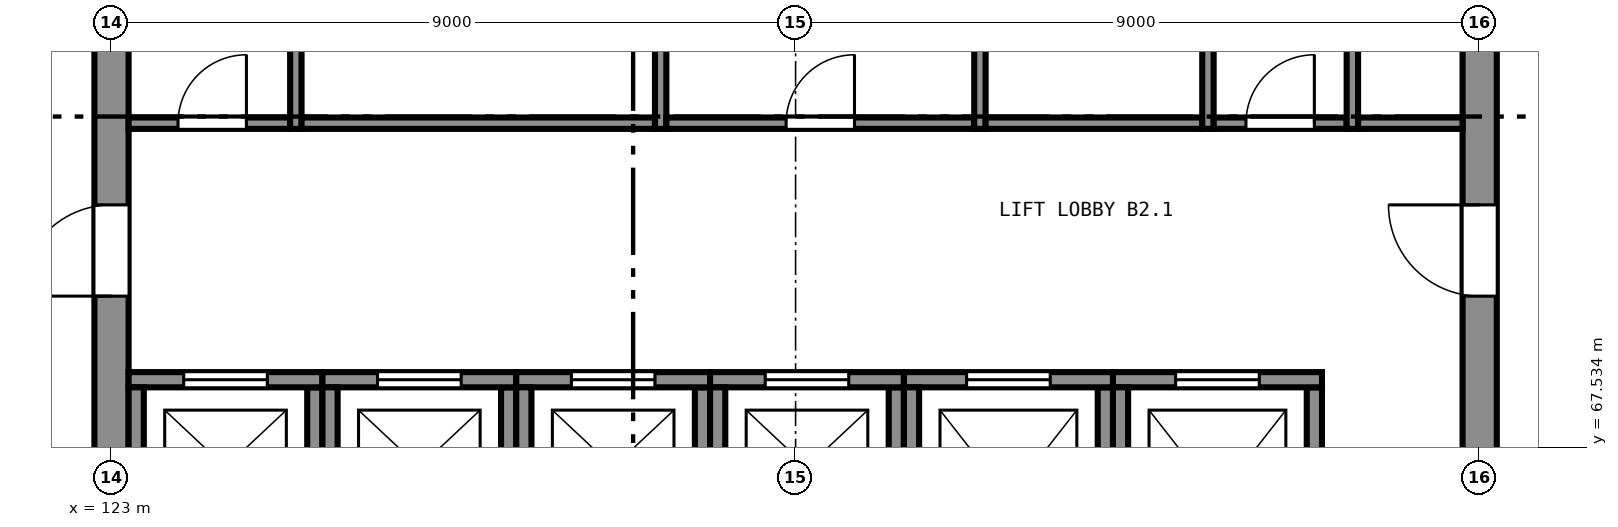
"""IFC4 building model, lengths in metres.
Left out: names, types, materials, properties, quantities, classifications, styles, units other than length and angle.
Written with IfcOpenShell. Run it as: python <this file> out.ifc"""

import sys

from ifc_helpers import new_model, si_unit, direction, frame, frame_2d, origin, place, context, subcontext, project, spatial, rectangle, extrude, element, fill, save


model = new_model("IFC4")
c1 = context("Model", 3, precision=1e-05, world=origin(), true_north=direction((0.0, 1.0)))
c2 = subcontext(c1, "Body", "Model", "MODEL_VIEW")
j1 = project(units=[si_unit("LENGTHUNIT", "METRE"), si_unit("PLANEANGLEUNIT", "RADIAN")], contexts=[c1])
p1 = place(None, origin())
s1 = spatial("IfcSite", under=j1, at=p1, CompositionType="ELEMENT")
p2 = place(p1, origin())
s2 = spatial("IfcBuilding", under=s1, at=p2, CompositionType="ELEMENT")
p3 = place(p2, frame((0.0, 0.0, -10.0)))
s3 = spatial("IfcBuildingStorey", under=s2, at=p3, CompositionType="ELEMENT", Elevation=-10.0)
p4 = place(p3, frame((141.0, 65.225, 0.0), z_axis=(0.0, 0.0, 1.0), x_axis=(0.0, 1.0, 0.0)))
e1 = element("IfcWall", 1, at=p4, inside=s3, PredefinedType="SHEAR", context=c2, shape_type="SweptSolid", body=[
    extrude(rectangle(XDim=17.55, YDim=0.45, at=frame_2d((8.775, 0.0))), origin(), (0.0, 0.0, 1.0), 5.0),
])
p5 = place(p4, frame((4.3, 0.0, 0.0)))
e2 = element("IfcOpeningElement", 2, at=p5, cuts=e1, PredefinedType="OPENING", context=c2, shape_type="SweptSolid", body=[
    extrude(rectangle(XDim=1.2, YDim=2.1, at=frame_2d((0.6, 1.05))), frame((0.0, 0.235, 0.0), z_axis=(0.0, -1.0, 0.0), x_axis=(1.0, 0.0, 0.0)), (0.0, 0.0, 1.0), 0.47),
])
p6 = place(p4, frame((12.05, 0.0, 0.0)))
e3 = element("IfcOpeningElement", 3, at=p6, cuts=e1, PredefinedType="OPENING", context=c2, shape_type="SweptSolid", body=[
    extrude(rectangle(XDim=1.2, YDim=2.1, at=frame_2d((0.6, 1.05))), frame((0.0, 0.235, 0.0), z_axis=(0.0, -1.0, 0.0), x_axis=(1.0, 0.0, 0.0)), (0.0, 0.0, 1.0), 0.47),
])
p7 = place(p3, frame((123.0, 82.775, 0.0), z_axis=(0.0, 0.0, 1.0), x_axis=(0.0, -1.0, 0.0)))
e4 = element("IfcWall", 4, at=p7, inside=s3, PredefinedType="SHEAR", context=c2, shape_type="SweptSolid", body=[
    extrude(rectangle(XDim=17.55, YDim=0.45, at=frame_2d((8.775, 0.0))), origin(), (0.0, 0.0, 1.0), 5.0),
])
p8 = place(p7, frame((12.05, 0.0, 0.0)))
e5 = element("IfcOpeningElement", 5, at=p8, cuts=e4, PredefinedType="OPENING", context=c2, shape_type="SweptSolid", body=[
    extrude(rectangle(XDim=1.2, YDim=2.1, at=frame_2d((0.6, 1.05))), frame((0.0, 0.235, 0.0), z_axis=(0.0, -1.0, 0.0), x_axis=(1.0, 0.0, 0.0)), (0.0, 0.0, 1.0), 0.47),
])
p9 = place(p7, frame((4.3, 0.0, 0.0)))
e6 = element("IfcOpeningElement", 6, at=p9, cuts=e4, PredefinedType="OPENING", context=c2, shape_type="SweptSolid", body=[
    extrude(rectangle(XDim=1.2, YDim=2.1, at=frame_2d((0.6, 1.05))), frame((0.0, 0.235, 0.0), z_axis=(0.0, -1.0, 0.0), x_axis=(1.0, 0.0, 0.0)), (0.0, 0.0, 1.0), 0.47),
])
p10 = place(p3, frame((125.675, 66.225, -1.9), z_axis=(0.0, 0.0, 1.0), x_axis=(0.0, 1.0, 0.0)))
e7 = element("IfcWall", 7, at=p10, inside=s3, PredefinedType="SHEAR", context=c2, shape_type="SweptSolid", body=[
    extrude(rectangle(XDim=2.1, YDim=0.2, at=frame_2d((1.05, 0.0))), origin(), (0.0, 0.0, 1.0), 6.9),
])
p11 = place(p3, frame((125.775, 68.425, -1.9), z_axis=(0.0, 0.0, 1.0), x_axis=(-1.0, 0.0, 0.0)))
e8 = element("IfcWall", 8, at=p11, inside=s3, PredefinedType="SHEAR", context=c2, shape_type="SweptSolid", body=[
    extrude(rectangle(XDim=2.55, YDim=0.2, at=frame_2d((1.275, 0.0))), origin(), (0.0, 0.0, 1.0), 6.9),
])
p12 = place(p11, frame((0.725, 0.0, 1.9)))
e9 = element("IfcOpeningElement", 9, at=p12, cuts=e8, PredefinedType="OPENING", context=c2, shape_type="SweptSolid", body=[
    extrude(rectangle(XDim=1.1, YDim=2.1, at=frame_2d((0.55, 1.05))), frame((0.0, 0.11, 0.0), z_axis=(0.0, -1.0, 0.0), x_axis=(1.0, 0.0, 0.0)), (0.0, 0.0, 1.0), 0.22),
])
for number, where, z_axis, x_axis in (
    (10, (123.325, 68.325, -1.9), (0.0, 0.0, 1.0), (0.0, -1.0, 0.0)),
    (11, (128.225, 66.225, -1.9), (0.0, 0.0, 1.0), (0.0, 1.0, 0.0)),
):
    element("IfcWall", number, at=place(p3, frame(where, z_axis=z_axis, x_axis=x_axis)), inside=s3, PredefinedType="SHEAR", context=c2, shape_type="SweptSolid", body=[
        extrude(rectangle(XDim=2.1, YDim=0.2, at=frame_2d((1.05, 0.0))), origin(), (0.0, 0.0, 1.0), 6.9),
    ])
p13 = place(p3, frame((128.325, 68.425, -1.9), z_axis=(0.0, 0.0, 1.0), x_axis=(-1.0, 0.0, 0.0)))
e12 = element("IfcWall", 12, at=p13, inside=s3, PredefinedType="SHEAR", context=c2, shape_type="SweptSolid", body=[
    extrude(rectangle(XDim=2.55, YDim=0.2, at=frame_2d((1.275, 0.0))), origin(), (0.0, 0.0, 1.0), 6.9),
])
p14 = place(p13, frame((0.725, 0.0, 1.9)))
e13 = element("IfcOpeningElement", 13, at=p14, cuts=e12, PredefinedType="OPENING", context=c2, shape_type="SweptSolid", body=[
    extrude(rectangle(XDim=1.1, YDim=2.1, at=frame_2d((0.55, 1.05))), frame((0.0, 0.11, 0.0), z_axis=(0.0, -1.0, 0.0), x_axis=(1.0, 0.0, 0.0)), (0.0, 0.0, 1.0), 0.22),
])
for number, where, z_axis, x_axis in (
    (14, (125.875, 68.325, -1.9), (0.0, 0.0, 1.0), (0.0, -1.0, 0.0)),
    (15, (130.775, 66.225, -1.9), (0.0, 0.0, 1.0), (0.0, 1.0, 0.0)),
):
    element("IfcWall", number, at=place(p3, frame(where, z_axis=z_axis, x_axis=x_axis)), inside=s3, PredefinedType="SHEAR", context=c2, shape_type="SweptSolid", body=[
        extrude(rectangle(XDim=2.1, YDim=0.2, at=frame_2d((1.05, 0.0))), origin(), (0.0, 0.0, 1.0), 6.9),
    ])
p15 = place(p3, frame((130.875, 68.425, -1.9), z_axis=(0.0, 0.0, 1.0), x_axis=(-1.0, 0.0, 0.0)))
e16 = element("IfcWall", 16, at=p15, inside=s3, PredefinedType="SHEAR", context=c2, shape_type="SweptSolid", body=[
    extrude(rectangle(XDim=2.55, YDim=0.2, at=frame_2d((1.275, 0.0))), origin(), (0.0, 0.0, 1.0), 6.9),
])
p16 = place(p15, frame((0.725, 0.0, 1.9)))
e17 = element("IfcOpeningElement", 17, at=p16, cuts=e16, PredefinedType="OPENING", context=c2, shape_type="SweptSolid", body=[
    extrude(rectangle(XDim=1.1, YDim=2.1, at=frame_2d((0.55, 1.05))), frame((0.0, 0.11, 0.0), z_axis=(0.0, -1.0, 0.0), x_axis=(1.0, 0.0, 0.0)), (0.0, 0.0, 1.0), 0.22),
])
for number, where, z_axis, x_axis in (
    (18, (128.425, 68.325, -1.9), (0.0, 0.0, 1.0), (0.0, -1.0, 0.0)),
    (19, (133.325, 66.225, -1.9), (0.0, 0.0, 1.0), (0.0, 1.0, 0.0)),
):
    element("IfcWall", number, at=place(p3, frame(where, z_axis=z_axis, x_axis=x_axis)), inside=s3, PredefinedType="SHEAR", context=c2, shape_type="SweptSolid", body=[
        extrude(rectangle(XDim=2.1, YDim=0.2, at=frame_2d((1.05, 0.0))), origin(), (0.0, 0.0, 1.0), 6.9),
    ])
p17 = place(p3, frame((133.425, 68.425, -1.9), z_axis=(0.0, 0.0, 1.0), x_axis=(-1.0, 0.0, 0.0)))
e20 = element("IfcWall", 20, at=p17, inside=s3, PredefinedType="SHEAR", context=c2, shape_type="SweptSolid", body=[
    extrude(rectangle(XDim=2.55, YDim=0.2, at=frame_2d((1.275, 0.0))), origin(), (0.0, 0.0, 1.0), 6.9),
])
p18 = place(p17, frame((0.725, 0.0, 1.9)))
e21 = element("IfcOpeningElement", 21, at=p18, cuts=e20, PredefinedType="OPENING", context=c2, shape_type="SweptSolid", body=[
    extrude(rectangle(XDim=1.1, YDim=2.1, at=frame_2d((0.55, 1.05))), frame((0.0, 0.11, 0.0), z_axis=(0.0, -1.0, 0.0), x_axis=(1.0, 0.0, 0.0)), (0.0, 0.0, 1.0), 0.22),
])
p19 = place(p3, frame((130.975, 68.325, -1.9), z_axis=(0.0, 0.0, 1.0), x_axis=(0.0, -1.0, 0.0)))
e22 = element("IfcWall", 22, at=p19, inside=s3, PredefinedType="SHEAR", context=c2, shape_type="SweptSolid", body=[
    extrude(rectangle(XDim=2.1, YDim=0.2, at=frame_2d((1.05, 0.0))), origin(), (0.0, 0.0, 1.0), 6.9),
])
p20 = place(p3, frame((136.075, 65.425, -1.9), z_axis=(0.0, 0.0, 1.0), x_axis=(0.0, 1.0, 0.0)))
e23 = element("IfcWall", 23, at=p20, inside=s3, PredefinedType="SHEAR", context=c2, shape_type="SweptSolid", body=[
    extrude(rectangle(XDim=2.9, YDim=0.2, at=frame_2d((1.45, 0.0))), origin(), (0.0, 0.0, 1.0), 6.9),
])
p21 = place(p3, frame((136.175, 68.425, -1.9), z_axis=(0.0, 0.0, 1.0), x_axis=(-1.0, 0.0, 0.0)))
e24 = element("IfcWall", 24, at=p21, inside=s3, PredefinedType="SHEAR", context=c2, shape_type="SweptSolid", body=[
    extrude(rectangle(XDim=2.75, YDim=0.2, at=frame_2d((1.375, 0.0))), origin(), (0.0, 0.0, 1.0), 6.9),
])
p22 = place(p21, frame((0.825, 0.0, 1.9)))
e25 = element("IfcOpeningElement", 25, at=p22, cuts=e24, PredefinedType="OPENING", context=c2, shape_type="SweptSolid", body=[
    extrude(rectangle(XDim=1.1, YDim=2.1, at=frame_2d((0.55, 1.05))), frame((0.0, 0.11, 0.0), z_axis=(0.0, -1.0, 0.0), x_axis=(1.0, 0.0, 0.0)), (0.0, 0.0, 1.0), 0.22),
])
for number, where, z_axis, x_axis in (
    (26, (133.525, 68.325, -1.9), (0.0, 0.0, 1.0), (0.0, -1.0, 0.0)),
    (27, (138.825, 65.425, -1.9), (0.0, 0.0, 1.0), (0.0, 1.0, 0.0)),
):
    element("IfcWall", number, at=place(p3, frame(where, z_axis=z_axis, x_axis=x_axis)), inside=s3, PredefinedType="SHEAR", context=c2, shape_type="SweptSolid", body=[
        extrude(rectangle(XDim=2.9, YDim=0.2, at=frame_2d((1.45, 0.0))), origin(), (0.0, 0.0, 1.0), 6.9),
    ])
p23 = place(p3, frame((138.925, 68.425, -1.9), z_axis=(0.0, 0.0, 1.0), x_axis=(-1.0, 0.0, 0.0)))
e28 = element("IfcWall", 28, at=p23, inside=s3, PredefinedType="SHEAR", context=c2, shape_type="SweptSolid", body=[
    extrude(rectangle(XDim=2.75, YDim=0.2, at=frame_2d((1.375, 0.0))), origin(), (0.0, 0.0, 1.0), 6.9),
])
p24 = place(p23, frame((0.825, 0.0, 1.9)))
e29 = element("IfcOpeningElement", 29, at=p24, cuts=e28, PredefinedType="OPENING", context=c2, shape_type="SweptSolid", body=[
    extrude(rectangle(XDim=1.1, YDim=2.1, at=frame_2d((0.55, 1.05))), frame((0.0, 0.11, 0.0), z_axis=(0.0, -1.0, 0.0), x_axis=(1.0, 0.0, 0.0)), (0.0, 0.0, 1.0), 0.22),
])
p25 = place(p3, frame((136.275, 68.325, -1.9), z_axis=(0.0, 0.0, 1.0), x_axis=(0.0, -1.0, 0.0)))
e30 = element("IfcWall", 30, at=p25, inside=s3, PredefinedType="SHEAR", context=c2, shape_type="SweptSolid", body=[
    extrude(rectangle(XDim=2.9, YDim=0.2, at=frame_2d((1.45, 0.0))), origin(), (0.0, 0.0, 1.0), 6.9),
])
p26 = place(p3, frame((125.425, 71.725, 0.0), z_axis=(0.0, 0.0, 1.0), x_axis=(0.0, 1.0, 0.0)))
e31 = element("IfcWall", 31, at=p26, inside=s3, PredefinedType="PARTITIONING", context=c2, shape_type="SweptSolid", body=[
    extrude(rectangle(XDim=4.55, YDim=0.15, at=frame_2d((2.275, 0.0))), origin(), (0.0, 0.0, 1.0), 4.7),
])
p27 = place(p3, frame((123.225, 71.8, 0.0), z_axis=(0.0, 0.0, 1.0), x_axis=(1.0, 0.0, 0.0)))
e32 = element("IfcWall", 32, at=p27, inside=s3, PredefinedType="PARTITIONING", context=c2, shape_type="SweptSolid", body=[
    extrude(rectangle(XDim=2.125, YDim=0.15, at=frame_2d((1.062, 0.0))), origin(), (0.0, 0.0, 1.0), 4.7),
])
p28 = place(p27, frame((0.65, 0.0, 0.0)))
e33 = element("IfcOpeningElement", 33, at=p28, cuts=e32, PredefinedType="OPENING", context=c2, shape_type="SweptSolid", body=[
    extrude(rectangle(XDim=0.9, YDim=2.1, at=frame_2d((0.45, 1.05))), frame((0.0, 0.085, 0.0), z_axis=(0.0, -1.0, 0.0), x_axis=(1.0, 0.0, 0.0)), (0.0, 0.0, 1.0), 0.17),
])
p29 = place(p3, frame((130.225, 71.725, 0.0), z_axis=(0.0, 0.0, 1.0), x_axis=(0.0, 1.0, 0.0)))
e34 = element("IfcWall", 34, at=p29, inside=s3, PredefinedType="PARTITIONING", context=c2, shape_type="SweptSolid", body=[
    extrude(rectangle(XDim=4.55, YDim=0.15, at=frame_2d((2.275, 0.0))), origin(), (0.0, 0.0, 1.0), 4.7),
])
p30 = place(p3, frame((125.5, 71.8, 0.0), z_axis=(0.0, 0.0, 1.0), x_axis=(1.0, 0.0, 0.0)))
e35 = element("IfcWall", 35, at=p30, inside=s3, PredefinedType="PARTITIONING", context=c2, shape_type="SweptSolid", body=[
    extrude(rectangle(XDim=4.65, YDim=0.15, at=frame_2d((2.325, 0.0))), origin(), (0.0, 0.0, 1.0), 4.7),
])
p31 = place(p3, frame((134.425, 71.725, 0.0), z_axis=(0.0, 0.0, 1.0), x_axis=(0.0, 1.0, 0.0)))
e36 = element("IfcWall", 36, at=p31, inside=s3, PredefinedType="PARTITIONING", context=c2, shape_type="SweptSolid", body=[
    extrude(rectangle(XDim=4.55, YDim=0.15, at=frame_2d((2.275, 0.0))), origin(), (0.0, 0.0, 1.0), 4.7),
])
p32 = place(p3, frame((130.3, 71.8, 0.0), z_axis=(0.0, 0.0, 1.0), x_axis=(1.0, 0.0, 0.0)))
e37 = element("IfcWall", 37, at=p32, inside=s3, PredefinedType="PARTITIONING", context=c2, shape_type="SweptSolid", body=[
    extrude(rectangle(XDim=4.05, YDim=0.15, at=frame_2d((2.025, 0.0))), origin(), (0.0, 0.0, 1.0), 4.7),
])
p33 = place(p32, frame((1.575, 0.0, 0.0)))
e38 = element("IfcOpeningElement", 38, at=p33, cuts=e37, PredefinedType="OPENING", context=c2, shape_type="SweptSolid", body=[
    extrude(rectangle(XDim=0.9, YDim=2.1, at=frame_2d((0.45, 1.05))), frame((0.0, 0.085, 0.0), z_axis=(0.0, -1.0, 0.0), x_axis=(1.0, 0.0, 0.0)), (0.0, 0.0, 1.0), 0.17),
])
p34 = place(p3, frame((137.425, 71.725, 0.0), z_axis=(0.0, 0.0, 1.0), x_axis=(0.0, 1.0, 0.0)))
e39 = element("IfcWall", 39, at=p34, inside=s3, PredefinedType="PARTITIONING", context=c2, shape_type="SweptSolid", body=[
    extrude(rectangle(XDim=4.55, YDim=0.15, at=frame_2d((2.275, 0.0))), origin(), (0.0, 0.0, 1.0), 4.7),
])
p35 = place(p3, frame((134.5, 71.8, 0.0), z_axis=(0.0, 0.0, 1.0), x_axis=(1.0, 0.0, 0.0)))
e40 = element("IfcWall", 40, at=p35, inside=s3, PredefinedType="PARTITIONING", context=c2, shape_type="SweptSolid", body=[
    extrude(rectangle(XDim=2.85, YDim=0.15, at=frame_2d((1.425, 0.0))), origin(), (0.0, 0.0, 1.0), 4.7),
])
p36 = place(p3, frame((139.325, 71.725, 0.0), z_axis=(0.0, 0.0, 1.0), x_axis=(0.0, 1.0, 0.0)))
e41 = element("IfcWall", 41, at=p36, inside=s3, PredefinedType="PARTITIONING", context=c2, shape_type="SweptSolid", body=[
    extrude(rectangle(XDim=4.55, YDim=0.15, at=frame_2d((2.275, 0.0))), origin(), (0.0, 0.0, 1.0), 4.7),
])
p37 = place(p3, frame((137.5, 71.8, 0.0), z_axis=(0.0, 0.0, 1.0), x_axis=(1.0, 0.0, 0.0)))
e42 = element("IfcWall", 42, at=p37, inside=s3, PredefinedType="PARTITIONING", context=c2, shape_type="SweptSolid", body=[
    extrude(rectangle(XDim=1.75, YDim=0.15, at=frame_2d((0.875, 0.0))), origin(), (0.0, 0.0, 1.0), 4.7),
])
p38 = place(p37, frame((0.425, 0.0, 0.0)))
e43 = element("IfcOpeningElement", 43, at=p38, cuts=e42, PredefinedType="OPENING", context=c2, shape_type="SweptSolid", body=[
    extrude(rectangle(XDim=0.9, YDim=2.1, at=frame_2d((0.45, 1.05))), frame((0.0, 0.085, 0.0), z_axis=(0.0, -1.0, 0.0), x_axis=(1.0, 0.0, 0.0)), (0.0, 0.0, 1.0), 0.17),
])
p39 = place(p3, frame((139.4, 71.8, 0.0), z_axis=(0.0, 0.0, 1.0), x_axis=(1.0, 0.0, 0.0)))
e44 = element("IfcWall", 44, at=p39, inside=s3, PredefinedType="PARTITIONING", context=c2, shape_type="SweptSolid", body=[
    extrude(rectangle(XDim=1.375, YDim=0.15, at=frame_2d((0.688, 0.0))), origin(), (0.0, 0.0, 1.0), 4.7),
])
p40 = place(p12, origin())
e45 = element("IfcDoor", 45, at=p40, inside=s3, OperationType="SLIDING_TO_LEFT", PredefinedType="DOOR", context=c2, shape_type="SweptSolid", body=[
    extrude(rectangle(XDim=1.1, YDim=2.1, at=frame_2d((0.55, 1.05))), frame((0.0, 0.025, 0.0), z_axis=(0.0, -1.0, 0.0), x_axis=(1.0, 0.0, 0.0)), (0.0, 0.0, 1.0), 0.05),
])
fill(e9, e45)
p41 = place(p14, origin())
e46 = element("IfcDoor", 46, at=p41, inside=s3, OperationType="SLIDING_TO_LEFT", PredefinedType="DOOR", context=c2, shape_type="SweptSolid", body=[
    extrude(rectangle(XDim=1.1, YDim=2.1, at=frame_2d((0.55, 1.05))), frame((0.0, 0.025, 0.0), z_axis=(0.0, -1.0, 0.0), x_axis=(1.0, 0.0, 0.0)), (0.0, 0.0, 1.0), 0.05),
])
fill(e13, e46)
p42 = place(p16, origin())
e47 = element("IfcDoor", 47, at=p42, inside=s3, OperationType="SLIDING_TO_LEFT", PredefinedType="DOOR", context=c2, shape_type="SweptSolid", body=[
    extrude(rectangle(XDim=1.1, YDim=2.1, at=frame_2d((0.55, 1.05))), frame((0.0, 0.025, 0.0), z_axis=(0.0, -1.0, 0.0), x_axis=(1.0, 0.0, 0.0)), (0.0, 0.0, 1.0), 0.05),
])
fill(e17, e47)
p43 = place(p18, origin())
e48 = element("IfcDoor", 48, at=p43, inside=s3, OperationType="SLIDING_TO_LEFT", PredefinedType="DOOR", context=c2, shape_type="SweptSolid", body=[
    extrude(rectangle(XDim=1.1, YDim=2.1, at=frame_2d((0.55, 1.05))), frame((0.0, 0.025, 0.0), z_axis=(0.0, -1.0, 0.0), x_axis=(1.0, 0.0, 0.0)), (0.0, 0.0, 1.0), 0.05),
])
fill(e21, e48)
p44 = place(p22, origin())
e49 = element("IfcDoor", 49, at=p44, inside=s3, OperationType="SLIDING_TO_LEFT", PredefinedType="DOOR", context=c2, shape_type="SweptSolid", body=[
    extrude(rectangle(XDim=1.1, YDim=2.1, at=frame_2d((0.55, 1.05))), frame((0.0, 0.025, 0.0), z_axis=(0.0, -1.0, 0.0), x_axis=(1.0, 0.0, 0.0)), (0.0, 0.0, 1.0), 0.05),
])
fill(e25, e49)
p45 = place(p24, origin())
e50 = element("IfcDoor", 50, at=p45, inside=s3, OperationType="SLIDING_TO_LEFT", PredefinedType="DOOR", context=c2, shape_type="SweptSolid", body=[
    extrude(rectangle(XDim=1.1, YDim=2.1, at=frame_2d((0.55, 1.05))), frame((0.0, 0.025, 0.0), z_axis=(0.0, -1.0, 0.0), x_axis=(1.0, 0.0, 0.0)), (0.0, 0.0, 1.0), 0.05),
])
fill(e29, e50)
p46 = place(p8, frame((1.2, 0.0, 0.0), z_axis=(0.0, 0.0, 1.0), x_axis=(-1.0, 0.0, 0.0)))
e51 = element("IfcDoor", 51, at=p46, inside=s3, OperationType="SINGLE_SWING_RIGHT", PredefinedType="DOOR", context=c2, shape_type="SweptSolid", body=[
    extrude(rectangle(XDim=1.2, YDim=2.1, at=frame_2d((0.6, 1.05))), frame((0.0, 0.025, 0.0), z_axis=(0.0, -1.0, 0.0), x_axis=(1.0, 0.0, 0.0)), (0.0, 0.0, 1.0), 0.05),
])
fill(e5, e51)
p47 = place(p5, origin())
e52 = element("IfcDoor", 52, at=p47, inside=s3, OperationType="SINGLE_SWING_LEFT", PredefinedType="DOOR", context=c2, shape_type="SweptSolid", body=[
    extrude(rectangle(XDim=1.2, YDim=2.1, at=frame_2d((0.6, 1.05))), frame((0.0, 0.025, 0.0), z_axis=(0.0, -1.0, 0.0), x_axis=(1.0, 0.0, 0.0)), (0.0, 0.0, 1.0), 0.05),
])
fill(e2, e52)
p48 = place(p28, origin())
e53 = element("IfcDoor", 53, at=p48, inside=s3, OperationType="SINGLE_SWING_LEFT", PredefinedType="DOOR", context=c2, shape_type="SweptSolid", body=[
    extrude(rectangle(XDim=0.9, YDim=2.1, at=frame_2d((0.45, 1.05))), frame((0.0, 0.025, 0.0), z_axis=(0.0, -1.0, 0.0), x_axis=(1.0, 0.0, 0.0)), (0.0, 0.0, 1.0), 0.05),
])
fill(e33, e53)
p49 = place(p33, origin())
e54 = element("IfcDoor", 54, at=p49, inside=s3, OperationType="SINGLE_SWING_LEFT", PredefinedType="DOOR", context=c2, shape_type="SweptSolid", body=[
    extrude(rectangle(XDim=0.9, YDim=2.1, at=frame_2d((0.45, 1.05))), frame((0.0, 0.025, 0.0), z_axis=(0.0, -1.0, 0.0), x_axis=(1.0, 0.0, 0.0)), (0.0, 0.0, 1.0), 0.05),
])
fill(e38, e54)
p50 = place(p38, origin())
e55 = element("IfcDoor", 55, at=p50, inside=s3, OperationType="SINGLE_SWING_LEFT", PredefinedType="DOOR", context=c2, shape_type="SweptSolid", body=[
    extrude(rectangle(XDim=0.9, YDim=2.1, at=frame_2d((0.45, 1.05))), frame((0.0, 0.025, 0.0), z_axis=(0.0, -1.0, 0.0), x_axis=(1.0, 0.0, 0.0)), (0.0, 0.0, 1.0), 0.05),
])
fill(e43, e55)
save(model, sys.argv[1])
